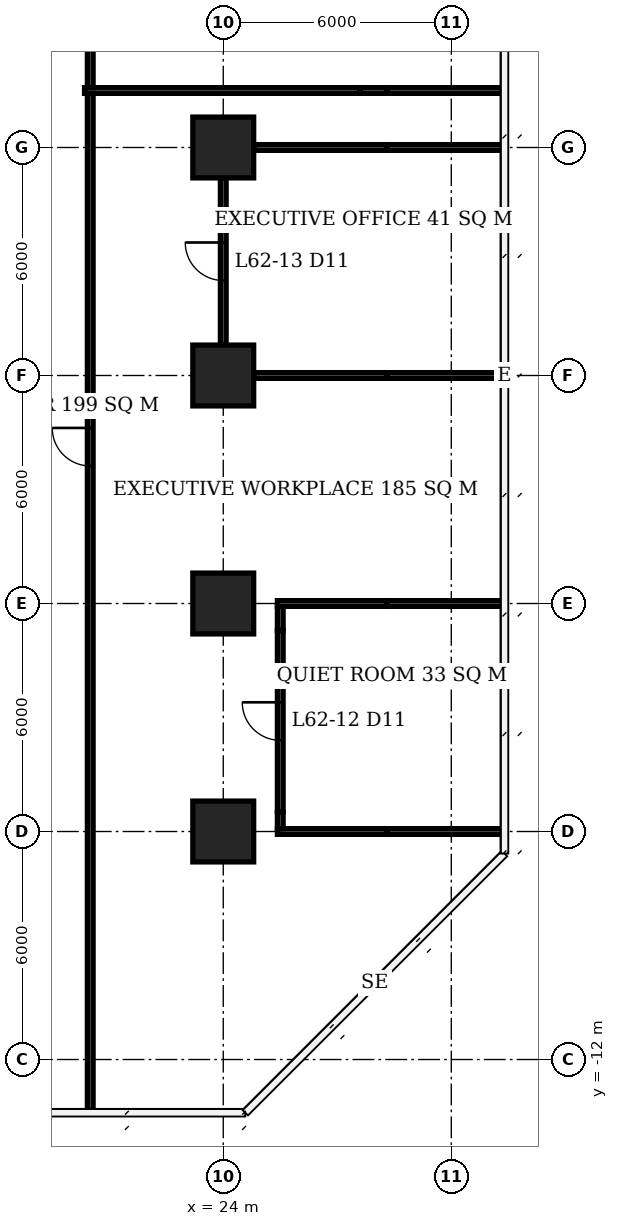
"""IFC4 building model, lengths in metres.
Left out: names, types, materials, properties, quantities, classifications, styles, units other than length and angle.
Written with IfcOpenShell. Run it as: python <this file> out.ifc"""

import sys

from ifc_helpers import new_model, si_unit, direction, frame, frame_2d, origin, origin_2d, place, context, subcontext, project, spatial, rectangle, extrude, element, fill, save


model = new_model("IFC4")
c1 = context("Model", 3, precision=1e-05, world=origin(), true_north=direction((0.0, 1.0)))
c2 = subcontext(c1, "Body", "Model", "MODEL_VIEW")
j1 = project(units=[si_unit("LENGTHUNIT", "METRE"), si_unit("PLANEANGLEUNIT", "RADIAN")], contexts=[c1])
p1 = place(None, origin())
s1 = spatial("IfcSite", under=j1, at=p1, CompositionType="ELEMENT")
p2 = place(p1, origin())
s2 = spatial("IfcBuilding", under=s1, at=p2, CompositionType="ELEMENT")
p3 = place(p2, frame((0.0, 0.0, 252.8)))
s3 = spatial("IfcBuildingStorey", under=s2, at=p3, CompositionType="ELEMENT", Elevation=252.8)
for number, where, z_axis, x_axis in (
    (1, (24.0, -6.0, 0.0), (0.0, 0.0, 1.0), (1.0, 0.0, 0.0)),
    (2, (24.0, 0.0, 0.0), (0.0, 0.0, 1.0), (1.0, 0.0, 0.0)),
    (3, (24.0, 6.0, 0.0), (0.0, 0.0, 1.0), (1.0, 0.0, 0.0)),
    (4, (24.0, 12.0, 0.0), (0.0, 0.0, 1.0), (1.0, 0.0, 0.0)),
):
    element("IfcColumn", number, at=place(p3, frame(where, z_axis=z_axis, x_axis=x_axis)), inside=s3, PredefinedType="COLUMN", context=c2, shape_type="SweptSolid", body=[
        extrude(rectangle(XDim=1.6, YDim=1.6, at=origin_2d()), origin(), (0.0, 0.0, 1.0), 3.9),
    ])
p4 = place(p3, frame((25.425, -6.0, 0.0), z_axis=(0.0, 0.0, 1.0), x_axis=(1.0, 0.0, 0.0)))
e5 = element("IfcWall", 5, at=p4, inside=s3, PredefinedType="PARTITIONING", context=c2, shape_type="SweptSolid", body=[
    extrude(rectangle(XDim=2.885, YDim=0.15, at=frame_2d((1.442, 0.0))), origin(), (0.0, 0.0, 1.0), 2.65),
])
p5 = place(p3, frame((28.31, -6.0, 0.0), z_axis=(0.0, 0.0, 1.0), x_axis=(1.0, 0.0, 0.0)))
e6 = element("IfcWall", 6, at=p5, inside=s3, PredefinedType="PARTITIONING", context=c2, shape_type="SweptSolid", body=[
    extrude(rectangle(XDim=3.065, YDim=0.15, at=frame_2d((1.532, 0.0))), origin(), (0.0, 0.0, 1.0), 3.65),
])
p6 = place(p3, frame((25.425, 0.0, 0.0), z_axis=(0.0, 0.0, 1.0), x_axis=(1.0, 0.0, 0.0)))
e7 = element("IfcWall", 7, at=p6, inside=s3, PredefinedType="PARTITIONING", context=c2, shape_type="SweptSolid", body=[
    extrude(rectangle(XDim=2.885, YDim=0.15, at=frame_2d((1.442, 0.0))), origin(), (0.0, 0.0, 1.0), 2.65),
])
p7 = place(p3, frame((28.31, 0.0, 0.0), z_axis=(0.0, 0.0, 1.0), x_axis=(1.0, 0.0, 0.0)))
e8 = element("IfcWall", 8, at=p7, inside=s3, PredefinedType="PARTITIONING", context=c2, shape_type="SweptSolid", body=[
    extrude(rectangle(XDim=3.065, YDim=0.15, at=frame_2d((1.532, 0.0))), origin(), (0.0, 0.0, 1.0), 3.65),
])
p8 = place(p3, frame((24.8, 6.0, 0.0), z_axis=(0.0, 0.0, 1.0), x_axis=(1.0, 0.0, 0.0)))
e9 = element("IfcWall", 9, at=p8, inside=s3, PredefinedType="PARTITIONING", context=c2, shape_type="SweptSolid", body=[
    extrude(rectangle(XDim=3.51, YDim=0.15, at=frame_2d((1.755, 0.0))), origin(), (0.0, 0.0, 1.0), 2.65),
])
p9 = place(p3, frame((28.31, 6.0, 0.0), z_axis=(0.0, 0.0, 1.0), x_axis=(1.0, 0.0, 0.0)))
e10 = element("IfcWall", 10, at=p9, inside=s3, PredefinedType="PARTITIONING", context=c2, shape_type="SweptSolid", body=[
    extrude(rectangle(XDim=3.04, YDim=0.15, at=frame_2d((1.52, 0.0))), origin(), (0.0, 0.0, 1.0), 3.65),
])
p10 = place(p3, frame((24.8, 12.0, 0.0), z_axis=(0.0, 0.0, 1.0), x_axis=(1.0, 0.0, 0.0)))
e11 = element("IfcWall", 11, at=p10, inside=s3, PredefinedType="PARTITIONING", context=c2, shape_type="SweptSolid", body=[
    extrude(rectangle(XDim=3.51, YDim=0.15, at=frame_2d((1.755, 0.0))), origin(), (0.0, 0.0, 1.0), 2.65),
])
p11 = place(p3, frame((28.31, 12.0, 0.0), z_axis=(0.0, 0.0, 1.0), x_axis=(1.0, 0.0, 0.0)))
e12 = element("IfcWall", 12, at=p11, inside=s3, PredefinedType="PARTITIONING", context=c2, shape_type="SweptSolid", body=[
    extrude(rectangle(XDim=3.065, YDim=0.15, at=frame_2d((1.532, 0.0))), origin(), (0.0, 0.0, 1.0), 3.65),
])
p12 = place(p3, frame((24.0, 6.8, 0.0), z_axis=(0.0, 0.0, 1.0), x_axis=(0.0, 1.0, 0.0)))
e13 = element("IfcWall", 13, at=p12, inside=s3, PredefinedType="PARTITIONING", context=c2, shape_type="SweptSolid", body=[
    extrude(rectangle(XDim=4.4, YDim=0.15, at=frame_2d((2.2, 0.0))), origin(), (0.0, 0.0, 1.0), 3.65),
])
p13 = place(p12, frame((1.7, 0.0, 0.0)))
e14 = element("IfcOpeningElement", 14, at=p13, cuts=e13, PredefinedType="OPENING", context=c2, shape_type="SweptSolid", body=[
    extrude(rectangle(XDim=1.0, YDim=2.4, at=frame_2d((0.5, 1.2))), frame((0.0, 0.085, 0.0), z_axis=(0.0, -1.0, 0.0), x_axis=(1.0, 0.0, 0.0)), (0.0, 0.0, 1.0), 0.17),
])
p14 = place(p3, frame((25.5, -5.925, 0.0), z_axis=(0.0, 0.0, 1.0), x_axis=(0.0, 1.0, 0.0)))
e15 = element("IfcWall", 15, at=p14, inside=s3, PredefinedType="PARTITIONING", context=c2, shape_type="SweptSolid", body=[
    extrude(rectangle(XDim=0.435, YDim=0.15, at=frame_2d((0.218, 0.0))), origin(), (0.0, 0.0, 1.0), 2.65),
])
p15 = place(p3, frame((25.5, -5.49, 0.0), z_axis=(0.0, 0.0, 1.0), x_axis=(0.0, 1.0, 0.0)))
e16 = element("IfcWall", 16, at=p15, inside=s3, PredefinedType="PARTITIONING", context=c2, shape_type="SweptSolid", body=[
    extrude(rectangle(XDim=4.78, YDim=0.15, at=frame_2d((2.39, 0.0))), origin(), (0.0, 0.0, 1.0), 3.65),
])
p16 = place(p15, frame((1.89, 0.0, 0.0)))
e17 = element("IfcOpeningElement", 17, at=p16, cuts=e16, PredefinedType="OPENING", context=c2, shape_type="SweptSolid", body=[
    extrude(rectangle(XDim=1.0, YDim=2.4, at=frame_2d((0.5, 1.2))), frame((0.0, 0.085, 0.0), z_axis=(0.0, -1.0, 0.0), x_axis=(1.0, 0.0, 0.0)), (0.0, 0.0, 1.0), 0.17),
])
p17 = place(p3, frame((25.5, -0.71, 0.0), z_axis=(0.0, 0.0, 1.0), x_axis=(0.0, 1.0, 0.0)))
e18 = element("IfcWall", 18, at=p17, inside=s3, PredefinedType="PARTITIONING", context=c2, shape_type="SweptSolid", body=[
    extrude(rectangle(XDim=0.635, YDim=0.15, at=frame_2d((0.317, 0.0))), origin(), (0.0, 0.0, 1.0), 2.65),
])
p18 = place(p3, frame((20.5, -13.375, 0.0), z_axis=(0.0, 0.0, 1.0), x_axis=(0.0, 1.0, 0.0)))
e19 = element("IfcWall", 19, at=p18, inside=s3, PredefinedType="PARTITIONING", context=c2, shape_type="SweptSolid", body=[
    extrude(rectangle(XDim=26.8, YDim=0.15, at=frame_2d((13.4, 0.0))), origin(), (0.0, 0.0, 1.0), 3.65),
])
p19 = place(p18, frame((16.995, 0.0, 0.0)))
e20 = element("IfcOpeningElement", 20, at=p19, cuts=e19, PredefinedType="OPENING", context=c2, shape_type="SweptSolid", body=[
    extrude(rectangle(XDim=1.0, YDim=2.4, at=frame_2d((0.5, 1.2))), frame((0.0, 0.085, 0.0), z_axis=(0.0, -1.0, 0.0), x_axis=(1.0, 0.0, 0.0)), (0.0, 0.0, 1.0), 0.17),
])
p20 = place(p3, frame((20.5, 13.575, 0.0), z_axis=(0.0, 0.0, 1.0), x_axis=(0.0, 1.0, 0.0)))
e21 = element("IfcWall", 21, at=p20, inside=s3, PredefinedType="PARTITIONING", context=c2, shape_type="SweptSolid", body=[
    extrude(rectangle(XDim=5.85, YDim=0.15, at=frame_2d((2.925, 0.0))), origin(), (0.0, 0.0, 1.0), 3.65),
])
p21 = place(p20, frame((3.325, 0.0, 0.0)))
e22 = element("IfcOpeningElement", 22, at=p21, cuts=e21, PredefinedType="OPENING", context=c2, shape_type="SweptSolid", body=[
    extrude(rectangle(XDim=1.0, YDim=2.4, at=frame_2d((0.5, 1.2))), frame((0.0, 0.085, 0.0), z_axis=(0.0, -1.0, 0.0), x_axis=(1.0, 0.0, 0.0)), (0.0, 0.0, 1.0), 0.17),
])
p22 = place(p3, frame((20.35, 13.5, 0.0), z_axis=(0.0, 0.0, 1.0), x_axis=(1.0, 0.0, 0.0)))
e23 = element("IfcWall", 23, at=p22, inside=s3, PredefinedType="PARTITIONING", context=c2, shape_type="SweptSolid", body=[
    extrude(rectangle(XDim=7.24, YDim=0.15, at=frame_2d((3.62, 0.0))), origin(), (0.0, 0.0, 1.0), 3.65),
])
p23 = place(p3, frame((27.59, 13.5, 0.0), z_axis=(0.0, 0.0, 1.0), x_axis=(1.0, 0.0, 0.0)))
e24 = element("IfcWall", 24, at=p23, inside=s3, PredefinedType="PARTITIONING", context=c2, shape_type="SweptSolid", body=[
    extrude(rectangle(XDim=0.72, YDim=0.15, at=frame_2d((0.36, 0.0))), origin(), (0.0, 0.0, 1.0), 2.65),
])
p24 = place(p3, frame((28.31, 13.5, 0.0), z_axis=(0.0, 0.0, 1.0), x_axis=(1.0, 0.0, 0.0)))
e25 = element("IfcWall", 25, at=p24, inside=s3, PredefinedType="PARTITIONING", context=c2, shape_type="SweptSolid", body=[
    extrude(rectangle(XDim=3.065, YDim=0.15, at=frame_2d((1.532, 0.0))), origin(), (0.0, 0.0, 1.0), 3.65),
])
p25 = place(p16, origin())
e26 = element("IfcDoor", 26, at=p25, inside=s3, OperationType="SINGLE_SWING_RIGHT", PredefinedType="DOOR", context=c2, shape_type="SweptSolid", body=[
    extrude(rectangle(XDim=1.0, YDim=2.4, at=frame_2d((0.5, 1.2))), frame((0.0, 0.025, 0.0), z_axis=(0.0, -1.0, 0.0), x_axis=(1.0, 0.0, 0.0)), (0.0, 0.0, 1.0), 0.05),
])
fill(e17, e26)
p26 = place(p13, origin())
e27 = element("IfcDoor", 27, at=p26, inside=s3, OperationType="SINGLE_SWING_RIGHT", PredefinedType="DOOR", context=c2, shape_type="SweptSolid", body=[
    extrude(rectangle(XDim=1.0, YDim=2.4, at=frame_2d((0.5, 1.2))), frame((0.0, 0.025, 0.0), z_axis=(0.0, -1.0, 0.0), x_axis=(1.0, 0.0, 0.0)), (0.0, 0.0, 1.0), 0.05),
])
fill(e14, e27)
p27 = place(p19, origin())
e28 = element("IfcDoor", 28, at=p27, inside=s3, OperationType="SINGLE_SWING_RIGHT", PredefinedType="DOOR", context=c2, shape_type="SweptSolid", body=[
    extrude(rectangle(XDim=1.0, YDim=2.4, at=frame_2d((0.5, 1.2))), frame((0.0, 0.025, 0.0), z_axis=(0.0, -1.0, 0.0), x_axis=(1.0, 0.0, 0.0)), (0.0, 0.0, 1.0), 0.05),
])
fill(e20, e28)
save(model, sys.argv[1])
